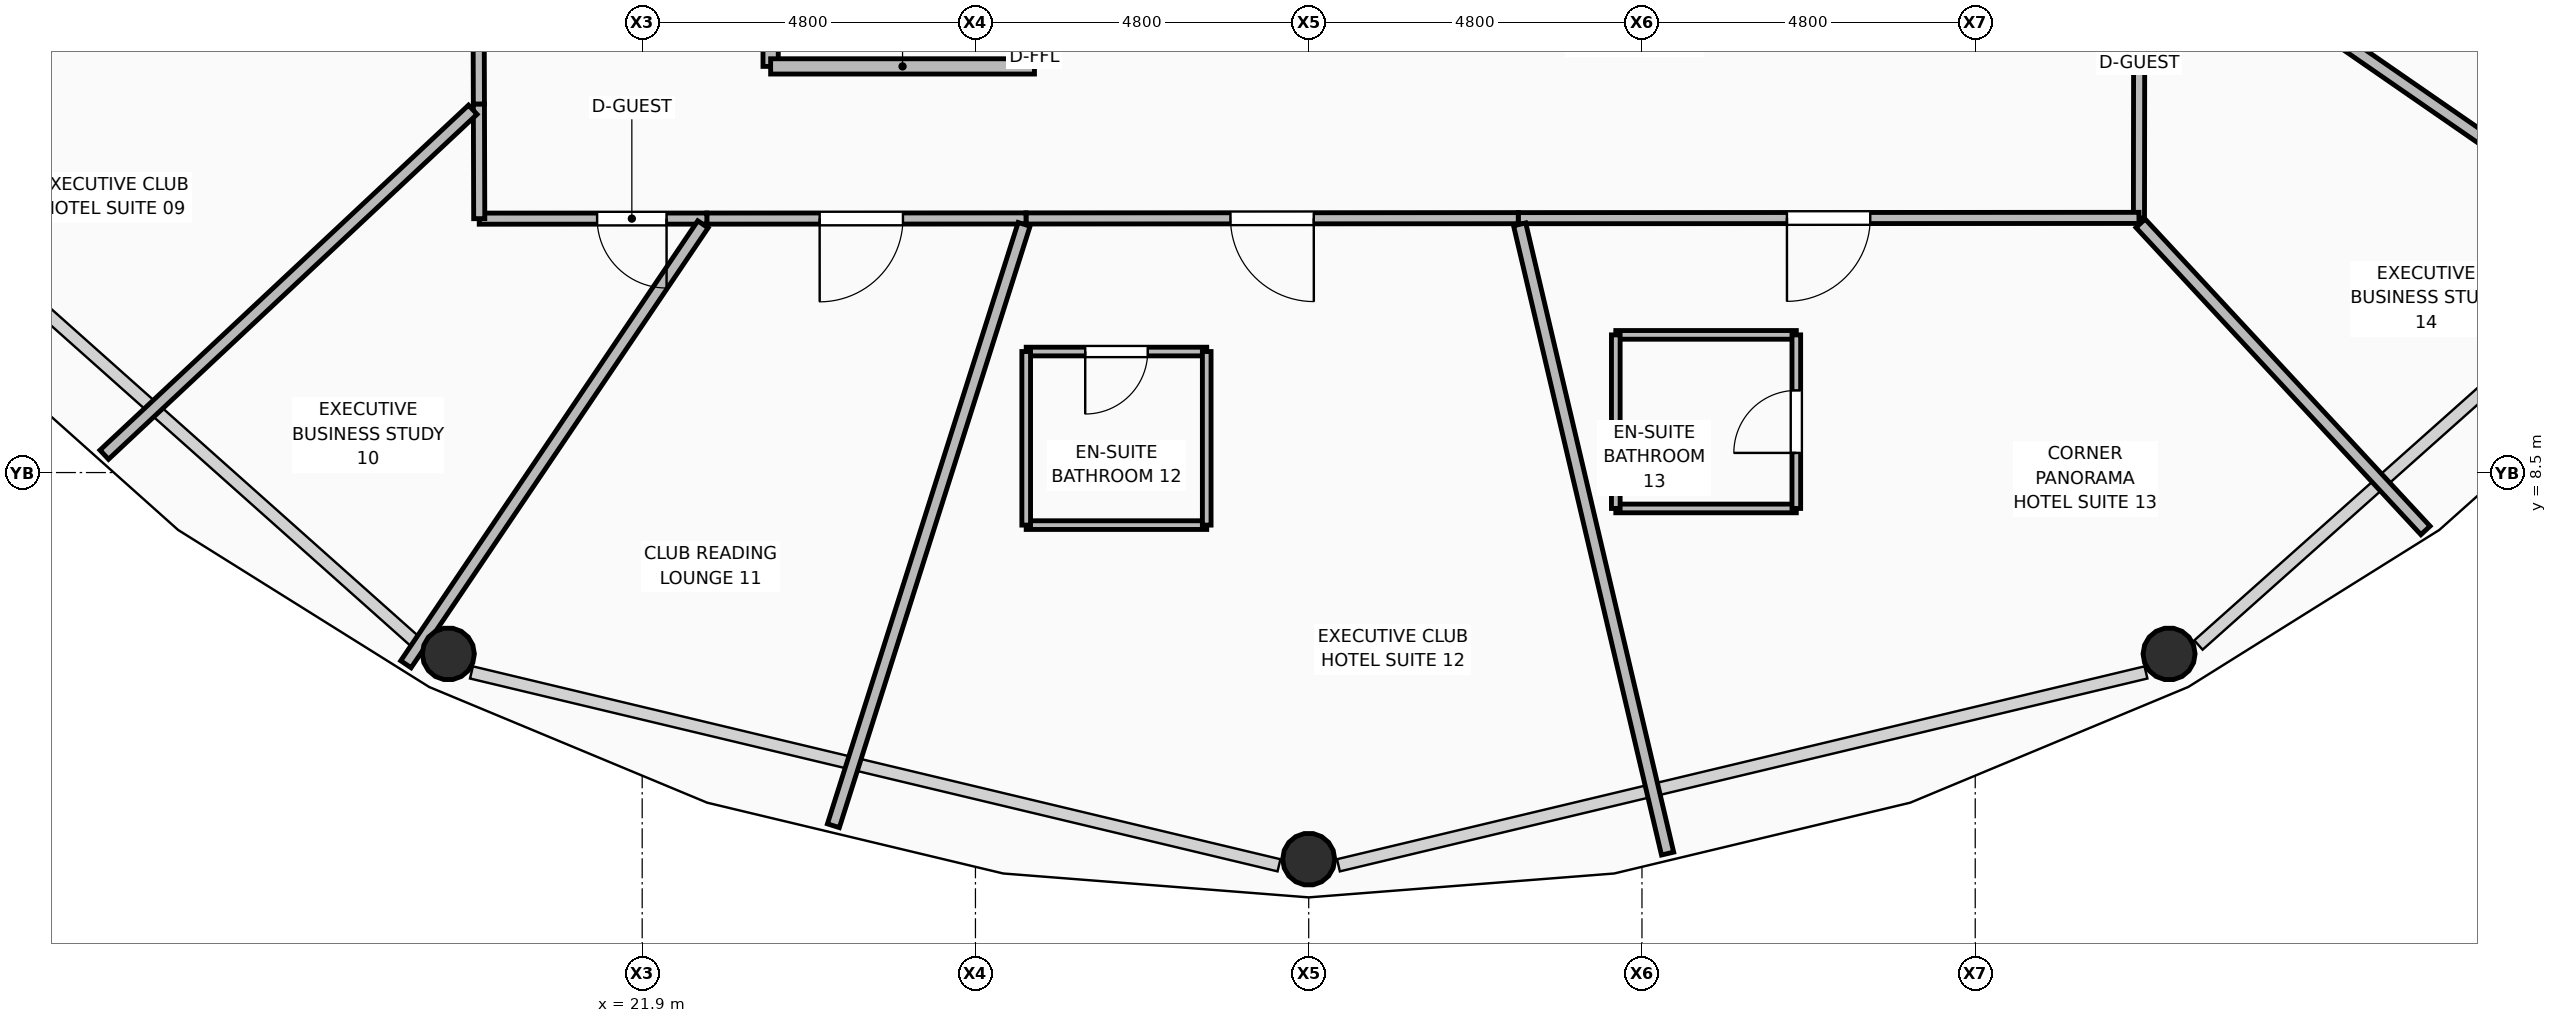
"""IFC4 building model, lengths in metres.
Left out: names, types, materials, properties, quantities, classifications, styles, units other than length and angle.
Written with IfcOpenShell. Run it as: python <this file> out.ifc"""

import sys

from ifc_helpers import new_model, si_unit, direction, frame, frame_2d, origin, origin_2d, place, context, subcontext, project, spatial, rectangle, hollow_circle, extrude, element, fill, save


model = new_model("IFC4")
c1 = context("Model", 3, precision=1e-05, world=origin(), true_north=direction((0.0, 1.0)))
c2 = subcontext(c1, "Body", "Model", "MODEL_VIEW")
j1 = project(units=[si_unit("LENGTHUNIT", "METRE"), si_unit("PLANEANGLEUNIT", "RADIAN")], contexts=[c1])
p1 = place(None, origin())
s1 = spatial("IfcSite", under=j1, at=p1, CompositionType="ELEMENT")
p2 = place(p1, origin())
s2 = spatial("IfcBuilding", under=s1, at=p2, CompositionType="ELEMENT")
p3 = place(p2, frame((0.0, 0.0, 157.2)))
s3 = spatial("IfcBuildingStorey", under=s2, at=p3, CompositionType="ELEMENT", Elevation=157.2)
for number, where, z_axis, x_axis in (
    (1, (19.108, 5.888, 0.0), (0.0, 0.0, 1.0), (1.0, 0.0, 0.0)),
    (2, (31.5, 2.931, 0.0), (0.0, 0.0, 1.0), (1.0, 0.0, 0.0)),
    (3, (43.892, 5.888, 0.0), (0.0, 0.0, 1.0), (1.0, 0.0, 0.0)),
):
    element("IfcColumn", number, at=place(p3, frame(where, z_axis=z_axis, x_axis=x_axis)), inside=s3, PredefinedType="COLUMN", context=c2, shape_type="SweptSolid", body=[
        extrude(hollow_circle(Radius=0.375, WallThickness=0.035, at=origin_2d()), origin(), (0.0, 0.0, 1.0), 3.57),
    ])
p4 = place(p3, frame((23.75, 14.35, 0.0), z_axis=(0.0, 0.0, 1.0), x_axis=(0.0, 1.0, 0.0)))
e4 = element("IfcWall", 4, at=p4, inside=s3, PredefinedType="PARTITIONING", context=c2, shape_type="SweptSolid", body=[
    extrude(rectangle(XDim=3.45, YDim=0.22, at=frame_2d((1.725, 0.0))), origin(), (0.0, 0.0, 1.0), 3.006),
])
p5 = place(p3, frame((23.75, 14.35, 0.0), z_axis=(0.0, 0.0, 1.0), x_axis=(1.0, 0.0, 0.0)))
e5 = element("IfcWall", 5, at=p5, inside=s3, PredefinedType="PARTITIONING", context=c2, shape_type="SweptSolid", body=[
    extrude(rectangle(XDim=3.8, YDim=0.22, at=frame_2d((1.9, 0.0))), origin(), (0.0, 0.0, 1.0), 3.55),
])
p6 = place(p3, frame((27.55, 14.35, 0.0), z_axis=(0.0, 0.0, 1.0), x_axis=(0.0, 1.0, 0.0)))
e6 = element("IfcWall", 6, at=p6, inside=s3, PredefinedType="PARTITIONING", context=c2, shape_type="SweptSolid", body=[
    extrude(rectangle(XDim=3.45, YDim=0.22, at=frame_2d((1.725, 0.0))), origin(), (0.0, 0.0, 1.0), 3.006),
])
p7 = place(p6, frame((1.175, 0.0, 0.0)))
e7 = element("IfcOpeningElement", 7, at=p7, cuts=e6, PredefinedType="OPENING", context=c2, shape_type="SweptSolid", body=[
    extrude(rectangle(XDim=1.1, YDim=2.1, at=frame_2d((0.55, 1.05))), frame((0.0, 0.12, 0.0), z_axis=(0.0, -1.0, 0.0), x_axis=(1.0, 0.0, 0.0)), (0.0, 0.0, 1.0), 0.24),
])
p8 = place(p3, frame((43.464, 16.729, 0.0), z_axis=(0.0, 0.0, 1.0), x_axis=(-0.001338185291, -0.99999910463, 0.0)))
e8 = element("IfcWall", 8, at=p8, inside=s3, PredefinedType="PARTITIONING", context=c2, shape_type="SweptSolid", body=[
    extrude(rectangle(XDim=4.561, YDim=0.16, at=frame_2d((2.281, 0.0))), origin(), (0.0, 0.0, 1.0), 3.55),
])
p9 = place(p8, frame((0.602, 0.0, 0.0)))
e9 = element("IfcOpeningElement", 9, at=p9, cuts=e8, PredefinedType="OPENING", context=c2, shape_type="SweptSolid", body=[
    extrude(rectangle(XDim=1.0, YDim=2.1, at=frame_2d((0.5, 1.05))), frame((0.0, 0.09, 0.0), z_axis=(0.0, -1.0, 0.0), x_axis=(1.0, 0.0, 0.0)), (0.0, 0.0, 1.0), 0.18),
])
p10 = place(p3, frame((43.458, 12.168, 0.0), z_axis=(0.0, 0.0, 1.0), x_axis=(-0.99999990454, -0.000436943538, 0.0)))
e10 = element("IfcWall", 10, at=p10, inside=s3, PredefinedType="PARTITIONING", context=c2, shape_type="SweptSolid", body=[
    extrude(rectangle(XDim=8.94, YDim=0.16, at=frame_2d((4.47, 0.0))), origin(), (0.0, 0.0, 1.0), 3.006),
])
p11 = place(p10, frame((3.87, 0.0, 0.0)))
e11 = element("IfcOpeningElement", 11, at=p11, cuts=e10, PredefinedType="OPENING", context=c2, shape_type="SweptSolid", body=[
    extrude(rectangle(XDim=1.2, YDim=2.1, at=frame_2d((0.6, 1.05))), frame((0.0, 0.09, 0.0), z_axis=(0.0, -1.0, 0.0), x_axis=(1.0, 0.0, 0.0)), (0.0, 0.0, 1.0), 0.18),
])
p12 = place(p3, frame((34.518, 12.164, 0.0), z_axis=(0.0, 0.0, 1.0), x_axis=(-0.999999828666, -0.000585379191, 0.0)))
e12 = element("IfcWall", 12, at=p12, inside=s3, PredefinedType="PARTITIONING", context=c2, shape_type="SweptSolid", body=[
    extrude(rectangle(XDim=7.09, YDim=0.16, at=frame_2d((3.545, 0.0))), origin(), (0.0, 0.0, 1.0), 3.006),
])
p13 = place(p12, frame((2.945, 0.0, 0.0)))
e13 = element("IfcOpeningElement", 13, at=p13, cuts=e12, PredefinedType="OPENING", context=c2, shape_type="SweptSolid", body=[
    extrude(rectangle(XDim=1.2, YDim=2.1, at=frame_2d((0.6, 1.05))), frame((0.0, 0.09, 0.0), z_axis=(0.0, -1.0, 0.0), x_axis=(1.0, 0.0, 0.0)), (0.0, 0.0, 1.0), 0.18),
])
p14 = place(p3, frame((27.428, 12.16, 0.0), z_axis=(0.0, 0.0, 1.0), x_axis=(-0.99999990974, -0.000424876482, 0.0)))
e14 = element("IfcWall", 14, at=p14, inside=s3, PredefinedType="PARTITIONING", context=c2, shape_type="SweptSolid", body=[
    extrude(rectangle(XDim=4.597, YDim=0.16, at=frame_2d((2.298, 0.0))), origin(), (0.0, 0.0, 1.0), 3.55),
])
p15 = place(p14, frame((1.772, 0.0, 0.0)))
e15 = element("IfcOpeningElement", 15, at=p15, cuts=e14, PredefinedType="OPENING", context=c2, shape_type="SweptSolid", body=[
    extrude(rectangle(XDim=1.2, YDim=2.1, at=frame_2d((0.6, 1.05))), frame((0.0, 0.09, 0.0), z_axis=(0.0, -1.0, 0.0), x_axis=(1.0, 0.0, 0.0)), (0.0, 0.0, 1.0), 0.18),
])
p16 = place(p3, frame((22.831, 12.158, 0.0), z_axis=(0.0, 0.0, 1.0), x_axis=(-0.999999955626, -0.000297907189, 0.0)))
e16 = element("IfcWall", 16, at=p16, inside=s3, PredefinedType="PARTITIONING", context=c2, shape_type="SweptSolid", body=[
    extrude(rectangle(XDim=3.278, YDim=0.16, at=frame_2d((1.639, 0.0))), origin(), (0.0, 0.0, 1.0), 3.006),
])
p17 = place(p16, frame((0.58, 0.0, 0.0)))
e17 = element("IfcOpeningElement", 17, at=p17, cuts=e16, PredefinedType="OPENING", context=c2, shape_type="SweptSolid", body=[
    extrude(rectangle(XDim=1.0, YDim=2.1, at=frame_2d((0.5, 1.05))), frame((0.0, 0.09, 0.0), z_axis=(0.0, -1.0, 0.0), x_axis=(1.0, 0.0, 0.0)), (0.0, 0.0, 1.0), 0.18),
])
p18 = place(p3, frame((19.553, 12.157, 0.0), z_axis=(0.0, 0.0, 1.0), x_axis=(-0.002955506524, 0.999995632481, 0.0)))
e18 = element("IfcWall", 18, at=p18, inside=s3, PredefinedType="PARTITIONING", context=c2, shape_type="SweptSolid", body=[
    extrude(rectangle(XDim=1.652, YDim=0.16, at=frame_2d((0.826, 0.0))), origin(), (0.0, 0.0, 1.0), 3.55),
])
p19 = place(p3, frame((19.548, 13.809, 0.0), z_axis=(0.0, 0.0, 1.0), x_axis=(-0.00317608091, 0.999994956242, 0.0)))
e19 = element("IfcWall", 19, at=p19, inside=s3, PredefinedType="PARTITIONING", context=c2, shape_type="SweptSolid", body=[
    extrude(rectangle(XDim=4.151, YDim=0.16, at=frame_2d((2.075, 0.0))), origin(), (0.0, 0.0, 1.0), 3.006),
])
p20 = place(p19, frame((2.791, 0.0, 0.0)))
e20 = element("IfcOpeningElement", 20, at=p20, cuts=e19, PredefinedType="OPENING", context=c2, shape_type="SweptSolid", body=[
    extrude(rectangle(XDim=1.2, YDim=2.1, at=frame_2d((0.6, 1.05))), frame((0.0, 0.09, 0.0), z_axis=(0.0, -1.0, 0.0), x_axis=(1.0, 0.0, 0.0)), (0.0, 0.0, 1.0), 0.18),
])
p21 = place(p3, frame((19.46, 13.726, 0.0), z_axis=(0.0, 0.0, 1.0), x_axis=(-0.730026032341, -0.683419338404, 0.0)))
e21 = element("IfcWall", 21, at=p21, inside=s3, PredefinedType="PARTITIONING", context=c2, shape_type="SweptSolid", body=[
    extrude(rectangle(XDim=7.271, YDim=0.18, at=frame_2d((3.635, 0.0))), origin(), (0.0, 0.0, 1.0), 2.852),
])
p22 = place(p3, frame((22.775, 12.075, 0.0), z_axis=(0.0, 0.0, 1.0), x_axis=(-0.559569383681, -0.828783509034, 0.0)))
e22 = element("IfcWall", 22, at=p22, inside=s3, PredefinedType="PARTITIONING", context=c2, shape_type="SweptSolid", body=[
    extrude(rectangle(XDim=7.645, YDim=0.18, at=frame_2d((3.822, 0.0))), origin(), (0.0, 0.0, 1.0), 2.852),
])
p23 = place(p3, frame((27.401, 12.075, 0.0), z_axis=(0.0, 0.0, 1.0), x_axis=(-0.302281968235, -0.953218553995, 0.0)))
e23 = element("IfcWall", 23, at=p23, inside=s3, PredefinedType="PARTITIONING", context=c2, shape_type="SweptSolid", body=[
    extrude(rectangle(XDim=9.087, YDim=0.18, at=frame_2d((4.543, 0.0))), origin(), (0.0, 0.0, 1.0), 2.852),
])
p24 = place(p3, frame((34.538, 12.075, 0.0), z_axis=(0.0, 0.0, 1.0), x_axis=(0.228875629266, -0.973455672503, 0.0)))
e24 = element("IfcWall", 24, at=p24, inside=s3, PredefinedType="PARTITIONING", context=c2, shape_type="SweptSolid", body=[
    extrude(rectangle(XDim=9.31, YDim=0.18, at=frame_2d((4.655, 0.0))), origin(), (0.0, 0.0, 1.0), 2.852),
])
p25 = place(p3, frame((43.481, 12.09, 0.0), z_axis=(0.0, 0.0, 1.0), x_axis=(0.680170141703, -0.73305428062, 0.0)))
e25 = element("IfcWall", 25, at=p25, inside=s3, PredefinedType="PARTITIONING", context=c2, shape_type="SweptSolid", body=[
    extrude(rectangle(XDim=6.034, YDim=0.18, at=frame_2d((3.017, 0.0))), origin(), (0.0, 0.0, 1.0), 2.852),
])
p26 = place(p3, frame((43.54, 16.677, 0.0), z_axis=(0.0, 0.0, 1.0), x_axis=(0.822542691302, -0.568703368186, 0.0)))
e26 = element("IfcWall", 26, at=p26, inside=s3, PredefinedType="PARTITIONING", context=c2, shape_type="SweptSolid", body=[
    extrude(rectangle(XDim=9.55, YDim=0.18, at=frame_2d((4.775, 0.0))), origin(), (0.0, 0.0, 1.0), 2.852),
])
p27 = place(p3, frame((27.431, 7.743, 0.0), z_axis=(0.0, 0.0, 1.0), x_axis=(1.0, 0.0, 0.0)))
e27 = element("IfcWall", 27, at=p27, inside=s3, PredefinedType="PARTITIONING", context=c2, shape_type="SweptSolid", body=[
    extrude(rectangle(XDim=2.6, YDim=0.125, at=frame_2d((1.3, 0.0))), origin(), (0.0, 0.0, 1.0), 3.55),
])
p28 = place(p3, frame((27.431, 10.243, 0.0), z_axis=(0.0, 0.0, 1.0), x_axis=(1.0, 0.0, 0.0)))
e28 = element("IfcWall", 28, at=p28, inside=s3, PredefinedType="PARTITIONING", context=c2, shape_type="SweptSolid", body=[
    extrude(rectangle(XDim=2.6, YDim=0.125, at=frame_2d((1.3, 0.0))), origin(), (0.0, 0.0, 1.0), 3.55),
])
p29 = place(p28, frame((0.85, 0.0, 0.0)))
e29 = element("IfcOpeningElement", 29, at=p29, cuts=e28, PredefinedType="OPENING", context=c2, shape_type="SweptSolid", body=[
    extrude(rectangle(XDim=0.9, YDim=2.1, at=frame_2d((0.45, 1.05))), frame((0.0, 0.073, 0.0), z_axis=(0.0, -1.0, 0.0), x_axis=(1.0, 0.0, 0.0)), (0.0, 0.0, 1.0), 0.145),
])
for number, where, z_axis, x_axis in (
    (30, (27.431, 7.743, 0.0), (0.0, 0.0, 1.0), (0.0, 1.0, 0.0)),
    (31, (30.031, 7.743, 0.0), (0.0, 0.0, 1.0), (0.0, 1.0, 0.0)),
):
    element("IfcWall", number, at=place(p3, frame(where, z_axis=z_axis, x_axis=x_axis)), inside=s3, PredefinedType="PARTITIONING", context=c2, shape_type="SweptSolid", body=[
        extrude(rectangle(XDim=2.5, YDim=0.125, at=frame_2d((1.25, 0.0))), origin(), (0.0, 0.0, 1.0), 3.55),
    ])
for number, where, z_axis, x_axis in (
    (32, (35.923, 7.983, 0.0), (0.0, 0.0, 1.0), (1.0, 0.0, 0.0)),
    (33, (35.923, 10.483, 0.0), (0.0, 0.0, 1.0), (1.0, 0.0, 0.0)),
):
    element("IfcWall", number, at=place(p3, frame(where, z_axis=z_axis, x_axis=x_axis)), inside=s3, PredefinedType="PARTITIONING", context=c2, shape_type="SweptSolid", body=[
        extrude(rectangle(XDim=2.6, YDim=0.125, at=frame_2d((1.3, 0.0))), origin(), (0.0, 0.0, 1.0), 3.55),
    ])
p30 = place(p3, frame((35.923, 7.983, 0.0), z_axis=(0.0, 0.0, 1.0), x_axis=(0.0, 1.0, 0.0)))
e34 = element("IfcWall", 34, at=p30, inside=s3, PredefinedType="PARTITIONING", context=c2, shape_type="SweptSolid", body=[
    extrude(rectangle(XDim=2.5, YDim=0.125, at=frame_2d((1.25, 0.0))), origin(), (0.0, 0.0, 1.0), 3.55),
])
p31 = place(p3, frame((38.523, 7.983, 0.0), z_axis=(0.0, 0.0, 1.0), x_axis=(0.0, 1.0, 0.0)))
e35 = element("IfcWall", 35, at=p31, inside=s3, PredefinedType="PARTITIONING", context=c2, shape_type="SweptSolid", body=[
    extrude(rectangle(XDim=2.5, YDim=0.125, at=frame_2d((1.25, 0.0))), origin(), (0.0, 0.0, 1.0), 3.55),
])
p32 = place(p31, frame((0.8, 0.0, 0.0)))
e36 = element("IfcOpeningElement", 36, at=p32, cuts=e35, PredefinedType="OPENING", context=c2, shape_type="SweptSolid", body=[
    extrude(rectangle(XDim=0.9, YDim=2.1, at=frame_2d((0.45, 1.05))), frame((0.0, 0.073, 0.0), z_axis=(0.0, -1.0, 0.0), x_axis=(1.0, 0.0, 0.0)), (0.0, 0.0, 1.0), 0.145),
])
p33 = place(p17, origin())
e37 = element("IfcDoor", 37, at=p33, inside=s3, OperationType="SINGLE_SWING_LEFT", PredefinedType="DOOR", context=c2, shape_type="SweptSolid", body=[
    extrude(rectangle(XDim=1.0, YDim=2.1, at=frame_2d((0.5, 1.05))), frame((0.0, 0.025, 0.0), z_axis=(0.0, -1.0, 0.0), x_axis=(1.0, 0.0, 0.0)), (0.0, 0.0, 1.0), 0.05),
])
fill(e17, e37)
p34 = place(p15, origin())
e38 = element("IfcDoor", 38, at=p34, inside=s3, OperationType="SINGLE_SWING_RIGHT", PredefinedType="DOOR", context=c2, shape_type="SweptSolid", body=[
    extrude(rectangle(XDim=1.2, YDim=2.1, at=frame_2d((0.6, 1.05))), frame((0.0, 0.025, 0.0), z_axis=(0.0, -1.0, 0.0), x_axis=(1.0, 0.0, 0.0)), (0.0, 0.0, 1.0), 0.05),
])
fill(e15, e38)
p35 = place(p29, frame((0.9, 0.0, 0.0), z_axis=(0.0, 0.0, 1.0), x_axis=(-1.0, 0.0, 0.0)))
e39 = element("IfcDoor", 39, at=p35, inside=s3, OperationType="SINGLE_SWING_RIGHT", PredefinedType="DOOR", context=c2, shape_type="SweptSolid", body=[
    extrude(rectangle(XDim=0.9, YDim=2.1, at=frame_2d((0.45, 1.05))), frame((0.0, 0.025, 0.0), z_axis=(0.0, -1.0, 0.0), x_axis=(1.0, 0.0, 0.0)), (0.0, 0.0, 1.0), 0.05),
])
fill(e29, e39)
p36 = place(p13, origin())
e40 = element("IfcDoor", 40, at=p36, inside=s3, OperationType="SINGLE_SWING_LEFT", PredefinedType="DOOR", context=c2, shape_type="SweptSolid", body=[
    extrude(rectangle(XDim=1.2, YDim=2.1, at=frame_2d((0.6, 1.05))), frame((0.0, 0.025, 0.0), z_axis=(0.0, -1.0, 0.0), x_axis=(1.0, 0.0, 0.0)), (0.0, 0.0, 1.0), 0.05),
])
fill(e13, e40)
p37 = place(p32, origin())
e41 = element("IfcDoor", 41, at=p37, inside=s3, OperationType="SINGLE_SWING_LEFT", PredefinedType="DOOR", context=c2, shape_type="SweptSolid", body=[
    extrude(rectangle(XDim=0.9, YDim=2.1, at=frame_2d((0.45, 1.05))), frame((0.0, 0.025, 0.0), z_axis=(0.0, -1.0, 0.0), x_axis=(1.0, 0.0, 0.0)), (0.0, 0.0, 1.0), 0.05),
])
fill(e36, e41)
p38 = place(p11, origin())
e42 = element("IfcDoor", 42, at=p38, inside=s3, OperationType="SINGLE_SWING_RIGHT", PredefinedType="DOOR", context=c2, shape_type="SweptSolid", body=[
    extrude(rectangle(XDim=1.2, YDim=2.1, at=frame_2d((0.6, 1.05))), frame((0.0, 0.025, 0.0), z_axis=(0.0, -1.0, 0.0), x_axis=(1.0, 0.0, 0.0)), (0.0, 0.0, 1.0), 0.05),
])
fill(e11, e42)
save(model, sys.argv[1])
